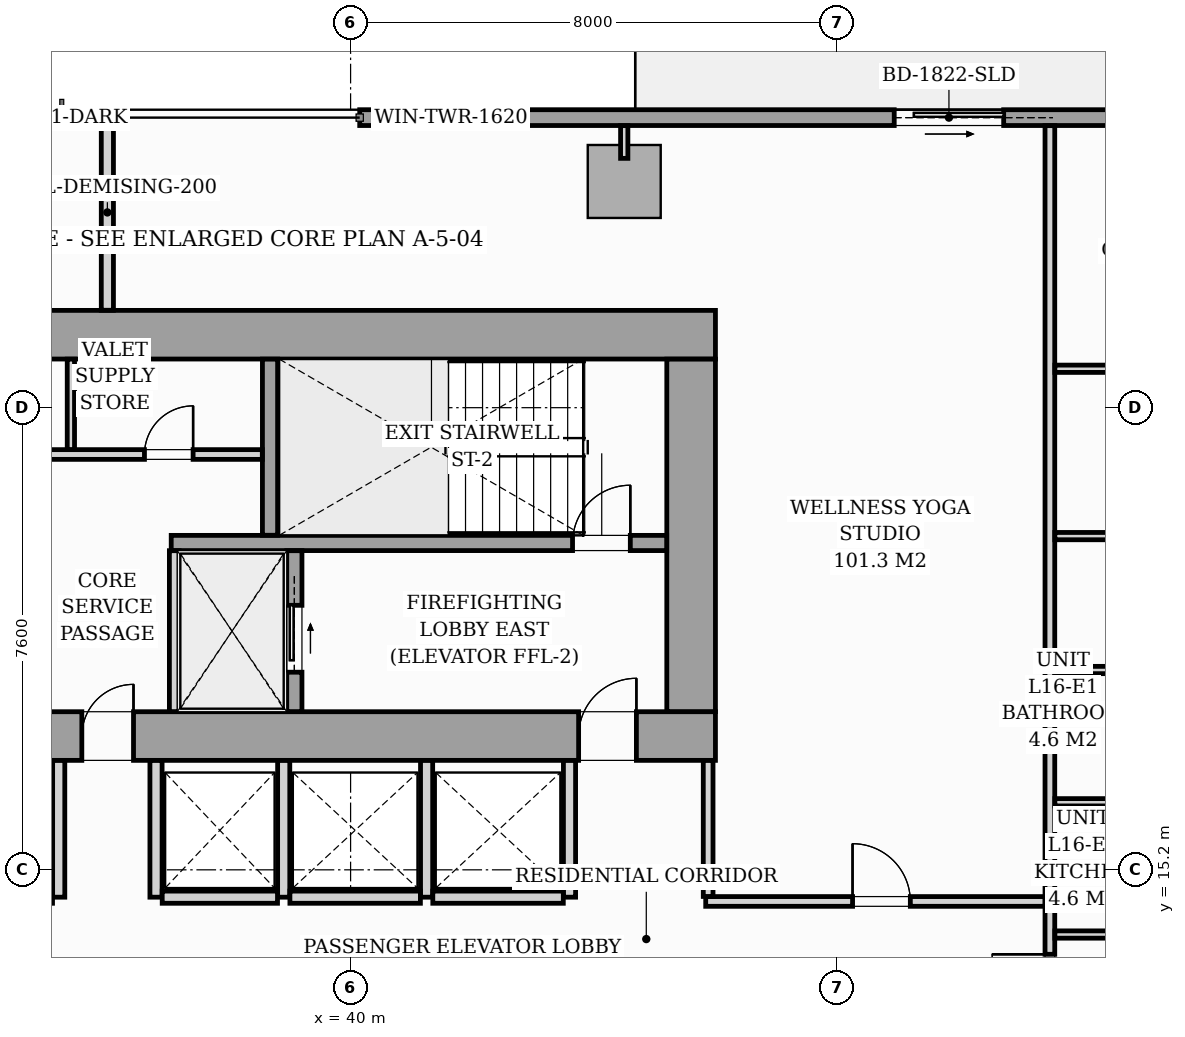
"""IFC4 building model, lengths in metres.
Left out: names, types, materials, properties, quantities, classifications, styles, units other than length and angle.
Written with IfcOpenShell. Run it as: python <this file> out.ifc"""

import sys

from ifc_helpers import new_model, si_unit, direction, frame, frame_2d, origin, origin_2d, place, context, subcontext, project, spatial, rectangle, i_section, extrude, source, transform, mapped, element, fill, save


model = new_model("IFC4")
c1 = context("Model", 3, precision=1e-05, world=origin(), true_north=direction((0.0, 1.0)))
c2 = subcontext(c1, "Body", "Model", "MODEL_VIEW")
j1 = project(units=[si_unit("LENGTHUNIT", "METRE"), si_unit("PLANEANGLEUNIT", "RADIAN")], contexts=[c1])
p1 = place(None, origin())
s1 = spatial("IfcSite", under=j1, at=p1, CompositionType="ELEMENT")
p2 = place(p1, origin())
s2 = spatial("IfcBuilding", under=s1, at=p2, CompositionType="ELEMENT")
p3 = place(p2, frame((0.0, 0.0, 58.2)))
s3 = spatial("IfcBuildingStorey", under=s2, at=p3, CompositionType="ELEMENT", Elevation=58.2)
m1 = source(origin(), c2, "Body", "SweptSolid", [
    extrude(i_section(OverallWidth=0.437, OverallDepth=0.514, WebThickness=0.061, FlangeThickness=0.097, FilletRadius=0.018, at=origin_2d()), origin(), (0.0, 0.0, 1.0), 3.196),
])
for number, where, z_axis, x_axis in (
    (1, (38.88, 17.4, 0.002), (0.0, 0.0, 1.0), (1.0, 0.0, 0.0)),
    (2, (45.6, 17.4, 0.002), (0.0, 0.0, 1.0), (1.0, 0.0, 0.0)),
    (3, (38.88, 24.0, 0.002), (0.0, 0.0, 1.0), (1.0, 0.0, 0.0)),
    (4, (45.6, 24.0, 0.002), (0.0, 0.0, 1.0), (1.0, 0.0, 0.0)),
):
    element("IfcColumn", number, at=place(p3, frame(where, z_axis=z_axis, x_axis=x_axis)), inside=s3, PredefinedType="PILASTER", context=c2, shape_type="MappedRepresentation", body=[
        mapped(m1, transform((0.0, 0.0, 0.0), scale=1.0)),
    ])
m2 = source(origin(), c2, "Body", "SweptSolid", [
    extrude(rectangle(XDim=1.2, YDim=1.2, at=origin_2d()), origin(), (0.0, 0.0, 1.0), 3.196),
])
p4 = place(p3, frame((44.5, 26.52, 0.002), z_axis=(0.0, 0.0, 1.0), x_axis=(1.0, 0.0, 0.0)))
e5 = element("IfcColumn", 5, at=p4, inside=s3, PredefinedType="COLUMN", context=c2, shape_type="MappedRepresentation", body=[
    mapped(m2, transform((0.0, 0.0, 0.0), scale=1.0)),
])
p5 = place(p3, frame((40.15, 27.57, 0.0), z_axis=(0.0, 0.0, 1.0), x_axis=(1.0, 0.0, 0.0)))
e6 = element("IfcWall", 6, at=p5, inside=s3, PredefinedType="STANDARD", context=c2, shape_type="SweptSolid", body=[
    extrude(rectangle(XDim=17.15, YDim=0.26, at=frame_2d((8.575, 0.0))), origin(), (0.0, 0.0, 1.0), 2.94),
])
p6 = place(p5, frame((8.79, 0.0, 0.0)))
e7 = element("IfcOpeningElement", 7, at=p6, cuts=e6, PredefinedType="OPENING", context=c2, shape_type="SweptSolid", body=[
    extrude(rectangle(XDim=1.8, YDim=2.06, at=frame_2d((0.9, 1.03))), frame((0.0, 0.14, 0.0), z_axis=(0.0, -1.0, 0.0), x_axis=(1.0, 0.0, 0.0)), (0.0, 0.0, 1.0), 0.28),
])
p7 = place(p5, frame((0.7, 0.0, 0.65)))
e8 = element("IfcOpeningElement", 8, at=p7, cuts=e6, PredefinedType="OPENING", context=c2, shape_type="SweptSolid", body=[
    extrude(rectangle(XDim=1.6, YDim=1.5, at=frame_2d((0.8, 0.75))), frame((0.0, 0.14, 0.0), z_axis=(0.0, -1.0, 0.0), x_axis=(1.0, 0.0, 0.0)), (0.0, 0.0, 1.0), 0.28),
])
p8 = place(p3, frame((26.0, 17.4, 0.0), z_axis=(0.0, 0.0, 1.0), x_axis=(1.0, 0.0, 0.0)))
e9 = element("IfcWall", 9, at=p8, inside=s3, PredefinedType="SHEAR", context=c2, shape_type="SweptSolid", body=[
    extrude(rectangle(XDim=20.0, YDim=0.8, at=frame_2d((10.0, 0.0))), origin(), (0.0, 0.0, 1.0), 3.2),
])
p9 = place(p8, frame((1.15, 0.0, 0.0)))
e10 = element("IfcOpeningElement", 10, at=p9, cuts=e9, PredefinedType="OPENING", context=c2, shape_type="SweptSolid", body=[
    extrude(rectangle(XDim=0.95, YDim=2.06, at=frame_2d((0.475, 1.03))), frame((0.0, 0.41, 0.0), z_axis=(0.0, -1.0, 0.0), x_axis=(1.0, 0.0, 0.0)), (0.0, 0.0, 1.0), 0.82),
])
p10 = place(p8, frame((9.58, 0.0, 0.0)))
e11 = element("IfcOpeningElement", 11, at=p10, cuts=e9, PredefinedType="OPENING", context=c2, shape_type="SweptSolid", body=[
    extrude(rectangle(XDim=0.85, YDim=2.0, at=frame_2d((0.425, 1.0))), frame((0.0, 0.41, 0.0), z_axis=(0.0, -1.0, 0.0), x_axis=(1.0, 0.0, 0.0)), (0.0, 0.0, 1.0), 0.82),
])
p11 = place(p8, frame((17.75, 0.0, 0.0)))
e12 = element("IfcOpeningElement", 12, at=p11, cuts=e9, PredefinedType="OPENING", context=c2, shape_type="SweptSolid", body=[
    extrude(rectangle(XDim=0.95, YDim=2.06, at=frame_2d((0.475, 1.03))), frame((0.0, 0.41, 0.0), z_axis=(0.0, -1.0, 0.0), x_axis=(1.0, 0.0, 0.0)), (0.0, 0.0, 1.0), 0.82),
])
p12 = place(p3, frame((26.0, 24.0, 0.0), z_axis=(0.0, 0.0, 1.0), x_axis=(1.0, 0.0, 0.0)))
e13 = element("IfcWall", 13, at=p12, inside=s3, PredefinedType="SHEAR", context=c2, shape_type="SweptSolid", body=[
    extrude(rectangle(XDim=20.0, YDim=0.8, at=frame_2d((10.0, 0.0))), origin(), (0.0, 0.0, 1.0), 3.2),
])
p13 = place(p3, frame((45.6, 17.802, 0.0), z_axis=(0.0, 0.0, 1.0), x_axis=(0.0, 1.0, 0.0)))
e14 = element("IfcWall", 14, at=p13, inside=s3, PredefinedType="SHEAR", context=c2, shape_type="SweptSolid", body=[
    extrude(rectangle(XDim=5.796, YDim=0.8, at=frame_2d((2.898, 0.0))), origin(), (0.0, 0.0, 1.0), 3.2),
])
p14 = place(p3, frame((37.05, 20.575, 0.0), z_axis=(0.0, 0.0, 1.0), x_axis=(1.0, 0.0, 0.0)))
e15 = element("IfcWall", 15, at=p14, inside=s3, PredefinedType="SOLIDWALL", context=c2, shape_type="SweptSolid", body=[
    extrude(rectangle(XDim=8.148, YDim=0.25, at=frame_2d((4.074, 0.0))), origin(), (0.0, 0.0, 1.0), 3.2),
])
p15 = place(p14, frame((6.6, 0.0, 0.0)))
e16 = element("IfcOpeningElement", 16, at=p15, cuts=e15, PredefinedType="OPENING", context=c2, shape_type="SweptSolid", body=[
    extrude(rectangle(XDim=0.95, YDim=2.06, at=frame_2d((0.475, 1.03))), frame((0.0, 0.135, 0.0), z_axis=(0.0, -1.0, 0.0), x_axis=(1.0, 0.0, 0.0)), (0.0, 0.0, 1.0), 0.27),
])
p16 = place(p3, frame((38.675, 20.702, 0.0), z_axis=(0.0, 0.0, 1.0), x_axis=(0.0, 1.0, 0.0)))
e17 = element("IfcWall", 17, at=p16, inside=s3, PredefinedType="SOLIDWALL", context=c2, shape_type="SweptSolid", body=[
    extrude(rectangle(XDim=2.896, YDim=0.25, at=frame_2d((1.448, 0.0))), origin(), (0.0, 0.0, 1.0), 3.2),
])
p17 = place(p3, frame((37.1, 17.802, 0.0), z_axis=(0.0, 0.0, 1.0), x_axis=(0.0, 1.0, 0.0)))
e18 = element("IfcWall", 18, at=p17, inside=s3, PredefinedType="PARTITIONING", context=c2, shape_type="SweptSolid", body=[
    extrude(rectangle(XDim=2.646, YDim=0.16, at=frame_2d((1.323, 0.0))), origin(), (0.0, 0.0, 1.0), 2.94),
])
p18 = place(p3, frame((39.075, 17.802, 0.0), z_axis=(0.0, 0.0, 1.0), x_axis=(0.0, 1.0, 0.0)))
e19 = element("IfcWall", 19, at=p18, inside=s3, PredefinedType="SOLIDWALL", context=c2, shape_type="SweptSolid", body=[
    extrude(rectangle(XDim=2.646, YDim=0.25, at=frame_2d((1.323, 0.0))), origin(), (0.0, 0.0, 1.0), 3.2),
])
p19 = place(p18, frame((0.648, 0.0, 0.0)))
e20 = element("IfcOpeningElement", 20, at=p19, cuts=e19, PredefinedType="OPENING", context=c2, shape_type="SweptSolid", body=[
    extrude(rectangle(XDim=1.1, YDim=2.08, at=frame_2d((0.55, 1.04))), frame((0.0, 0.135, 0.0), z_axis=(0.0, -1.0, 0.0), x_axis=(1.0, 0.0, 0.0)), (0.0, 0.0, 1.0), 0.27),
])
p20 = place(p3, frame((33.452, 22.03, 0.0), z_axis=(0.0, 0.0, 1.0), x_axis=(1.0, 0.0, 0.0)))
e21 = element("IfcWall", 21, at=p20, inside=s3, PredefinedType="PARTITIONING", context=c2, shape_type="SweptSolid", body=[
    extrude(rectangle(XDim=5.096, YDim=0.16, at=frame_2d((2.548, 0.0))), origin(), (0.0, 0.0, 1.0), 2.94),
])
p21 = place(p20, frame((0.538, 0.0, 0.0)))
e22 = element("IfcOpeningElement", 22, at=p21, cuts=e21, PredefinedType="OPENING", context=c2, shape_type="SweptSolid", body=[
    extrude(rectangle(XDim=0.8, YDim=2.05, at=frame_2d((0.4, 1.025))), frame((0.0, 0.09, 0.0), z_axis=(0.0, -1.0, 0.0), x_axis=(1.0, 0.0, 0.0)), (0.0, 0.0, 1.0), 0.18),
])
p22 = place(p20, frame((3.158, 0.0, 0.0)))
e23 = element("IfcOpeningElement", 23, at=p22, cuts=e21, PredefinedType="OPENING", context=c2, shape_type="SweptSolid", body=[
    extrude(rectangle(XDim=0.8, YDim=2.05, at=frame_2d((0.4, 1.025))), frame((0.0, 0.09, 0.0), z_axis=(0.0, -1.0, 0.0), x_axis=(1.0, 0.0, 0.0)), (0.0, 0.0, 1.0), 0.18),
])
p23 = place(p3, frame((35.4, 22.112, 0.0), z_axis=(0.0, 0.0, 1.0), x_axis=(0.0, 1.0, 0.0)))
e24 = element("IfcWall", 24, at=p23, inside=s3, PredefinedType="PARTITIONING", context=c2, shape_type="SweptSolid", body=[
    extrude(rectangle(XDim=1.486, YDim=0.12, at=frame_2d((0.743, 0.0))), origin(), (0.0, 0.0, 1.0), 2.94),
])
for number, where, z_axis, x_axis in (
    (25, (35.2, 14.75, 0.0), (0.0, 0.0, 1.0), (0.0, 1.0, 0.0)),
    (26, (36.8, 14.75, 0.0), (0.0, 0.0, 1.0), (0.0, 1.0, 0.0)),
    (27, (38.9, 14.75, 0.0), (0.0, 0.0, 1.0), (0.0, 1.0, 0.0)),
):
    element("IfcWall", number, at=place(p3, frame(where, z_axis=z_axis, x_axis=x_axis)), inside=s3, PredefinedType="PARTITIONING", context=c2, shape_type="SweptSolid", body=[
        extrude(rectangle(XDim=2.248, YDim=0.2, at=frame_2d((1.124, 0.0))), origin(), (0.0, 0.0, 1.0), 2.94),
    ])
p24 = place(p3, frame((36.902, 14.75, 0.0), z_axis=(0.0, 0.0, 1.0), x_axis=(1.0, 0.0, 0.0)))
e28 = element("IfcWall", 28, at=p24, inside=s3, PredefinedType="PARTITIONING", context=c2, shape_type="SweptSolid", body=[
    extrude(rectangle(XDim=1.896, YDim=0.2, at=frame_2d((0.948, 0.0))), origin(), (0.0, 0.0, 1.0), 2.94),
])
for number, where, z_axis, x_axis in (
    (29, (41.25, 14.75, 0.0), (0.0, 0.0, 1.0), (0.0, 1.0, 0.0)),
    (30, (43.6, 14.75, 0.0), (0.0, 0.0, 1.0), (0.0, 1.0, 0.0)),
):
    element("IfcWall", number, at=place(p3, frame(where, z_axis=z_axis, x_axis=x_axis)), inside=s3, PredefinedType="PARTITIONING", context=c2, shape_type="SweptSolid", body=[
        extrude(rectangle(XDim=2.248, YDim=0.2, at=frame_2d((1.124, 0.0))), origin(), (0.0, 0.0, 1.0), 2.94),
    ])
for number, where, z_axis, x_axis in (
    (31, (39.002, 14.75, 0.0), (0.0, 0.0, 1.0), (1.0, 0.0, 0.0)),
    (32, (41.352, 14.75, 0.0), (0.0, 0.0, 1.0), (1.0, 0.0, 0.0)),
):
    element("IfcWall", number, at=place(p3, frame(where, z_axis=z_axis, x_axis=x_axis)), inside=s3, PredefinedType="PARTITIONING", context=c2, shape_type="SweptSolid", body=[
        extrude(rectangle(XDim=2.146, YDim=0.2, at=frame_2d((1.073, 0.0))), origin(), (0.0, 0.0, 1.0), 2.94),
    ])
p25 = place(p3, frame((51.5, 12.432, 0.0), z_axis=(0.0, 0.0, 1.0), x_axis=(0.0, 1.0, 0.0)))
e33 = element("IfcWall", 33, at=p25, inside=s3, PredefinedType="PARTITIONING", context=c2, shape_type="SweptSolid", body=[
    extrude(rectangle(XDim=15.006, YDim=0.16, at=frame_2d((7.503, 0.0))), origin(), (0.0, 0.0, 1.0), 2.94),
])
p26 = place(p25, frame((0.429, 0.0, 0.0)))
e34 = element("IfcOpeningElement", 34, at=p26, cuts=e33, PredefinedType="OPENING", context=c2, shape_type="SweptSolid", body=[
    extrude(rectangle(XDim=0.95, YDim=2.06, at=frame_2d((0.475, 1.03))), frame((0.0, 0.09, 0.0), z_axis=(0.0, -1.0, 0.0), x_axis=(1.0, 0.0, 0.0)), (0.0, 0.0, 1.0), 0.18),
])
p27 = place(p3, frame((36.0, 24.402, 0.0), z_axis=(0.0, 0.0, 1.0), x_axis=(0.0, 1.0, 0.0)))
e35 = element("IfcWall", 35, at=p27, inside=s3, PredefinedType="PARTITIONING", context=c2, shape_type="SweptSolid", body=[
    extrude(rectangle(XDim=3.218, YDim=0.2, at=frame_2d((1.609, 0.0))), origin(), (0.0, 0.0, 1.0), 2.94),
])
p28 = place(p3, frame((51.582, 16.311, 0.0), z_axis=(0.0, 0.0, 1.0), x_axis=(1.0, 0.0, 0.0)))
e36 = element("IfcWall", 36, at=p28, inside=s3, PredefinedType="PARTITIONING", context=c2, shape_type="SweptSolid", body=[
    extrude(rectangle(XDim=2.256, YDim=0.12, at=frame_2d((1.128, 0.0))), origin(), (0.0, 0.0, 1.0), 2.045),
])
for number, where, z_axis, x_axis in (
    (37, (51.582, 14.136, 0.0), (0.0, 0.0, 1.0), (1.0, 0.0, 0.0)),
    (38, (51.582, 18.486, 0.0), (0.0, 0.0, 1.0), (1.0, 0.0, 0.0)),
):
    element("IfcWall", number, at=place(p3, frame(where, z_axis=z_axis, x_axis=x_axis)), inside=s3, PredefinedType="PARTITIONING", context=c2, shape_type="SweptSolid", body=[
        extrude(rectangle(XDim=2.256, YDim=0.12, at=frame_2d((1.128, 0.0))), origin(), (0.0, 0.0, 1.0), 2.94),
    ])
p29 = place(p3, frame((51.582, 23.44, 0.0), z_axis=(0.0, 0.0, 1.0), x_axis=(1.0, 0.0, 0.0)))
e39 = element("IfcWall", 39, at=p29, inside=s3, PredefinedType="PARTITIONING", context=c2, shape_type="SweptSolid", body=[
    extrude(rectangle(XDim=8.138, YDim=0.12, at=frame_2d((4.069, 0.0))), origin(), (0.0, 0.0, 1.0), 2.94),
])
p30 = place(p29, frame((3.653, 0.0, 0.0)))
e40 = element("IfcOpeningElement", 40, at=p30, cuts=e39, PredefinedType="OPENING", context=c2, shape_type="SweptSolid", body=[
    extrude(rectangle(XDim=0.85, YDim=2.05, at=frame_2d((0.425, 1.025))), frame((0.0, 0.07, 0.0), z_axis=(0.0, -1.0, 0.0), x_axis=(1.0, 0.0, 0.0)), (0.0, 0.0, 1.0), 0.14),
])
p31 = place(p3, frame((51.582, 20.688, 0.0), z_axis=(0.0, 0.0, 1.0), x_axis=(1.0, 0.0, 0.0)))
e41 = element("IfcWall", 41, at=p31, inside=s3, PredefinedType="PARTITIONING", context=c2, shape_type="SweptSolid", body=[
    extrude(rectangle(XDim=8.138, YDim=0.12, at=frame_2d((4.069, 0.0))), origin(), (0.0, 0.0, 1.0), 2.94),
])
p32 = place(p31, frame((3.653, 0.0, 0.0)))
e42 = element("IfcOpeningElement", 42, at=p32, cuts=e41, PredefinedType="OPENING", context=c2, shape_type="SweptSolid", body=[
    extrude(rectangle(XDim=0.85, YDim=2.05, at=frame_2d((0.425, 1.025))), frame((0.0, 0.07, 0.0), z_axis=(0.0, -1.0, 0.0), x_axis=(1.0, 0.0, 0.0)), (0.0, 0.0, 1.0), 0.14),
])
p33 = place(p3, frame((45.84, 14.68, 0.0), z_axis=(0.0, 0.0, 1.0), x_axis=(1.0, 0.0, 0.0)))
e43 = element("IfcWall", 43, at=p33, inside=s3, PredefinedType="PARTITIONING", context=c2, shape_type="SweptSolid", body=[
    extrude(rectangle(XDim=5.578, YDim=0.16, at=frame_2d((2.789, 0.0))), origin(), (0.0, 0.0, 1.0), 2.94),
])
p34 = place(p33, frame((2.415, 0.0, 0.0)))
e44 = element("IfcOpeningElement", 44, at=p34, cuts=e43, PredefinedType="OPENING", context=c2, shape_type="SweptSolid", body=[
    extrude(rectangle(XDim=0.95, YDim=2.06, at=frame_2d((0.475, 1.03))), frame((0.0, 0.09, 0.0), z_axis=(0.0, -1.0, 0.0), x_axis=(1.0, 0.0, 0.0)), (0.0, 0.0, 1.0), 0.18),
])
p35 = place(p3, frame((45.88, 14.762, 0.0), z_axis=(0.0, 0.0, 1.0), x_axis=(0.0, 1.0, 0.0)))
e45 = element("IfcWall", 45, at=p35, inside=s3, PredefinedType="PARTITIONING", context=c2, shape_type="SweptSolid", body=[
    extrude(rectangle(XDim=2.236, YDim=0.16, at=frame_2d((1.118, 0.0))), origin(), (0.0, 0.0, 1.0), 2.94),
])
p36 = place(p3, frame((44.5, 26.9, 0.0), z_axis=(0.0, 0.0, 1.0), x_axis=(0.0, 1.0, 0.0)))
e46 = element("IfcWall", 46, at=p36, inside=s3, PredefinedType="PARTITIONING", context=c2, shape_type="SweptSolid", body=[
    extrude(rectangle(XDim=0.538, YDim=0.12, at=frame_2d((0.269, 0.0))), origin(), (0.0, 0.0, 1.0), 2.94),
])
m3 = source(origin(), c2, "Body", "SweptSolid", [
    extrude(rectangle(XDim=1.8, YDim=2.06, at=frame_2d((0.9, 1.03))), frame((0.0, 0.025, 0.0), z_axis=(0.0, -1.0, 0.0), x_axis=(1.0, 0.0, 0.0)), (0.0, 0.0, 1.0), 0.05),
])
p37 = place(p6, origin())
e47 = element("IfcDoor", 47, at=p37, inside=s3, OperationType="SLIDING_TO_RIGHT", PredefinedType="DOOR", context=c2, shape_type="MappedRepresentation", body=[
    mapped(m3, transform((0.0, 0.0, 0.0), scale=1.0)),
])
fill(e7, e47)
m4 = source(origin(), c2, "Body", "SweptSolid", [
    extrude(rectangle(XDim=1.6, YDim=1.5, at=frame_2d((0.8, 0.75))), frame((0.0, 0.03, 0.0), z_axis=(0.0, -1.0, 0.0), x_axis=(1.0, 0.0, 0.0)), (0.0, 0.0, 1.0), 0.06),
])
p38 = place(p7, origin())
e48 = element("IfcWindow", 48, at=p38, inside=s3, PartitioningType="SINGLE_PANEL", PredefinedType="WINDOW", context=c2, shape_type="MappedRepresentation", body=[
    mapped(m4, transform((0.0, 0.0, 0.0), scale=1.0)),
])
fill(e8, e48)
m5 = source(origin(), c2, "Body", "SweptSolid", [
    extrude(rectangle(XDim=0.85, YDim=2.0, at=frame_2d((0.425, 1.0))), frame((0.0, 0.025, 0.0), z_axis=(0.0, -1.0, 0.0), x_axis=(1.0, 0.0, 0.0)), (0.0, 0.0, 1.0), 0.05),
])
p39 = place(p10, origin())
e49 = element("IfcDoor", 49, at=p39, inside=s3, OperationType="SINGLE_SWING_RIGHT", PredefinedType="DOOR", context=c2, shape_type="MappedRepresentation", body=[
    mapped(m5, transform((0.0, 0.0, 0.0), scale=1.0)),
])
fill(e11, e49)
m6 = source(origin(), c2, "Body", "SweptSolid", [
    extrude(rectangle(XDim=0.95, YDim=2.06, at=frame_2d((0.475, 1.03))), frame((0.0, 0.025, 0.0), z_axis=(0.0, -1.0, 0.0), x_axis=(1.0, 0.0, 0.0)), (0.0, 0.0, 1.0), 0.05),
])
p40 = place(p11, origin())
e50 = element("IfcDoor", 50, at=p40, inside=s3, OperationType="SINGLE_SWING_RIGHT", PredefinedType="DOOR", context=c2, shape_type="MappedRepresentation", body=[
    mapped(m6, transform((0.0, 0.0, 0.0), scale=1.0)),
])
fill(e12, e50)
p41 = place(p15, origin())
e51 = element("IfcDoor", 51, at=p41, inside=s3, OperationType="SINGLE_SWING_RIGHT", PredefinedType="DOOR", context=c2, shape_type="MappedRepresentation", body=[
    mapped(m6, transform((0.0, 0.0, 0.0), scale=1.0)),
])
fill(e16, e51)
m7 = source(origin(), c2, "Body", "SweptSolid", [
    extrude(rectangle(XDim=1.1, YDim=2.08, at=frame_2d((0.55, 1.04))), frame((0.0, 0.025, 0.0), z_axis=(0.0, -1.0, 0.0), x_axis=(1.0, 0.0, 0.0)), (0.0, 0.0, 1.0), 0.05),
])
p42 = place(p19, origin())
e52 = element("IfcDoor", 52, at=p42, inside=s3, OperationType="SLIDING_TO_RIGHT", PredefinedType="DOOR", context=c2, shape_type="MappedRepresentation", body=[
    mapped(m7, transform((0.0, 0.0, 0.0), scale=1.0)),
])
fill(e20, e52)
m8 = source(origin(), c2, "Body", "SweptSolid", [
    extrude(rectangle(XDim=0.8, YDim=2.05, at=frame_2d((0.4, 1.025))), frame((0.0, 0.025, 0.0), z_axis=(0.0, -1.0, 0.0), x_axis=(1.0, 0.0, 0.0)), (0.0, 0.0, 1.0), 0.05),
])
p43 = place(p22, origin())
e53 = element("IfcDoor", 53, at=p43, inside=s3, OperationType="SINGLE_SWING_RIGHT", PredefinedType="DOOR", context=c2, shape_type="MappedRepresentation", body=[
    mapped(m8, transform((0.0, 0.0, 0.0), scale=1.0)),
])
fill(e23, e53)
m9 = source(origin(), c2, "Body", "SweptSolid", [
    extrude(rectangle(XDim=0.95, YDim=2.06, at=frame_2d((0.475, 1.03))), frame((0.0, 0.025, 0.0), z_axis=(0.0, -1.0, 0.0), x_axis=(1.0, 0.0, 0.0)), (0.0, 0.0, 1.0), 0.05),
])
p44 = place(p26, origin())
e54 = element("IfcDoor", 54, at=p44, inside=s3, OperationType="SINGLE_SWING_RIGHT", PredefinedType="DOOR", context=c2, shape_type="MappedRepresentation", body=[
    mapped(m9, transform((0.0, 0.0, 0.0), scale=1.0)),
])
fill(e34, e54)
p45 = place(p34, origin())
e55 = element("IfcDoor", 55, at=p45, inside=s3, OperationType="SINGLE_SWING_LEFT", PredefinedType="DOOR", context=c2, shape_type="MappedRepresentation", body=[
    mapped(m9, transform((0.0, 0.0, 0.0), scale=1.0)),
])
fill(e44, e55)
save(model, sys.argv[1])
